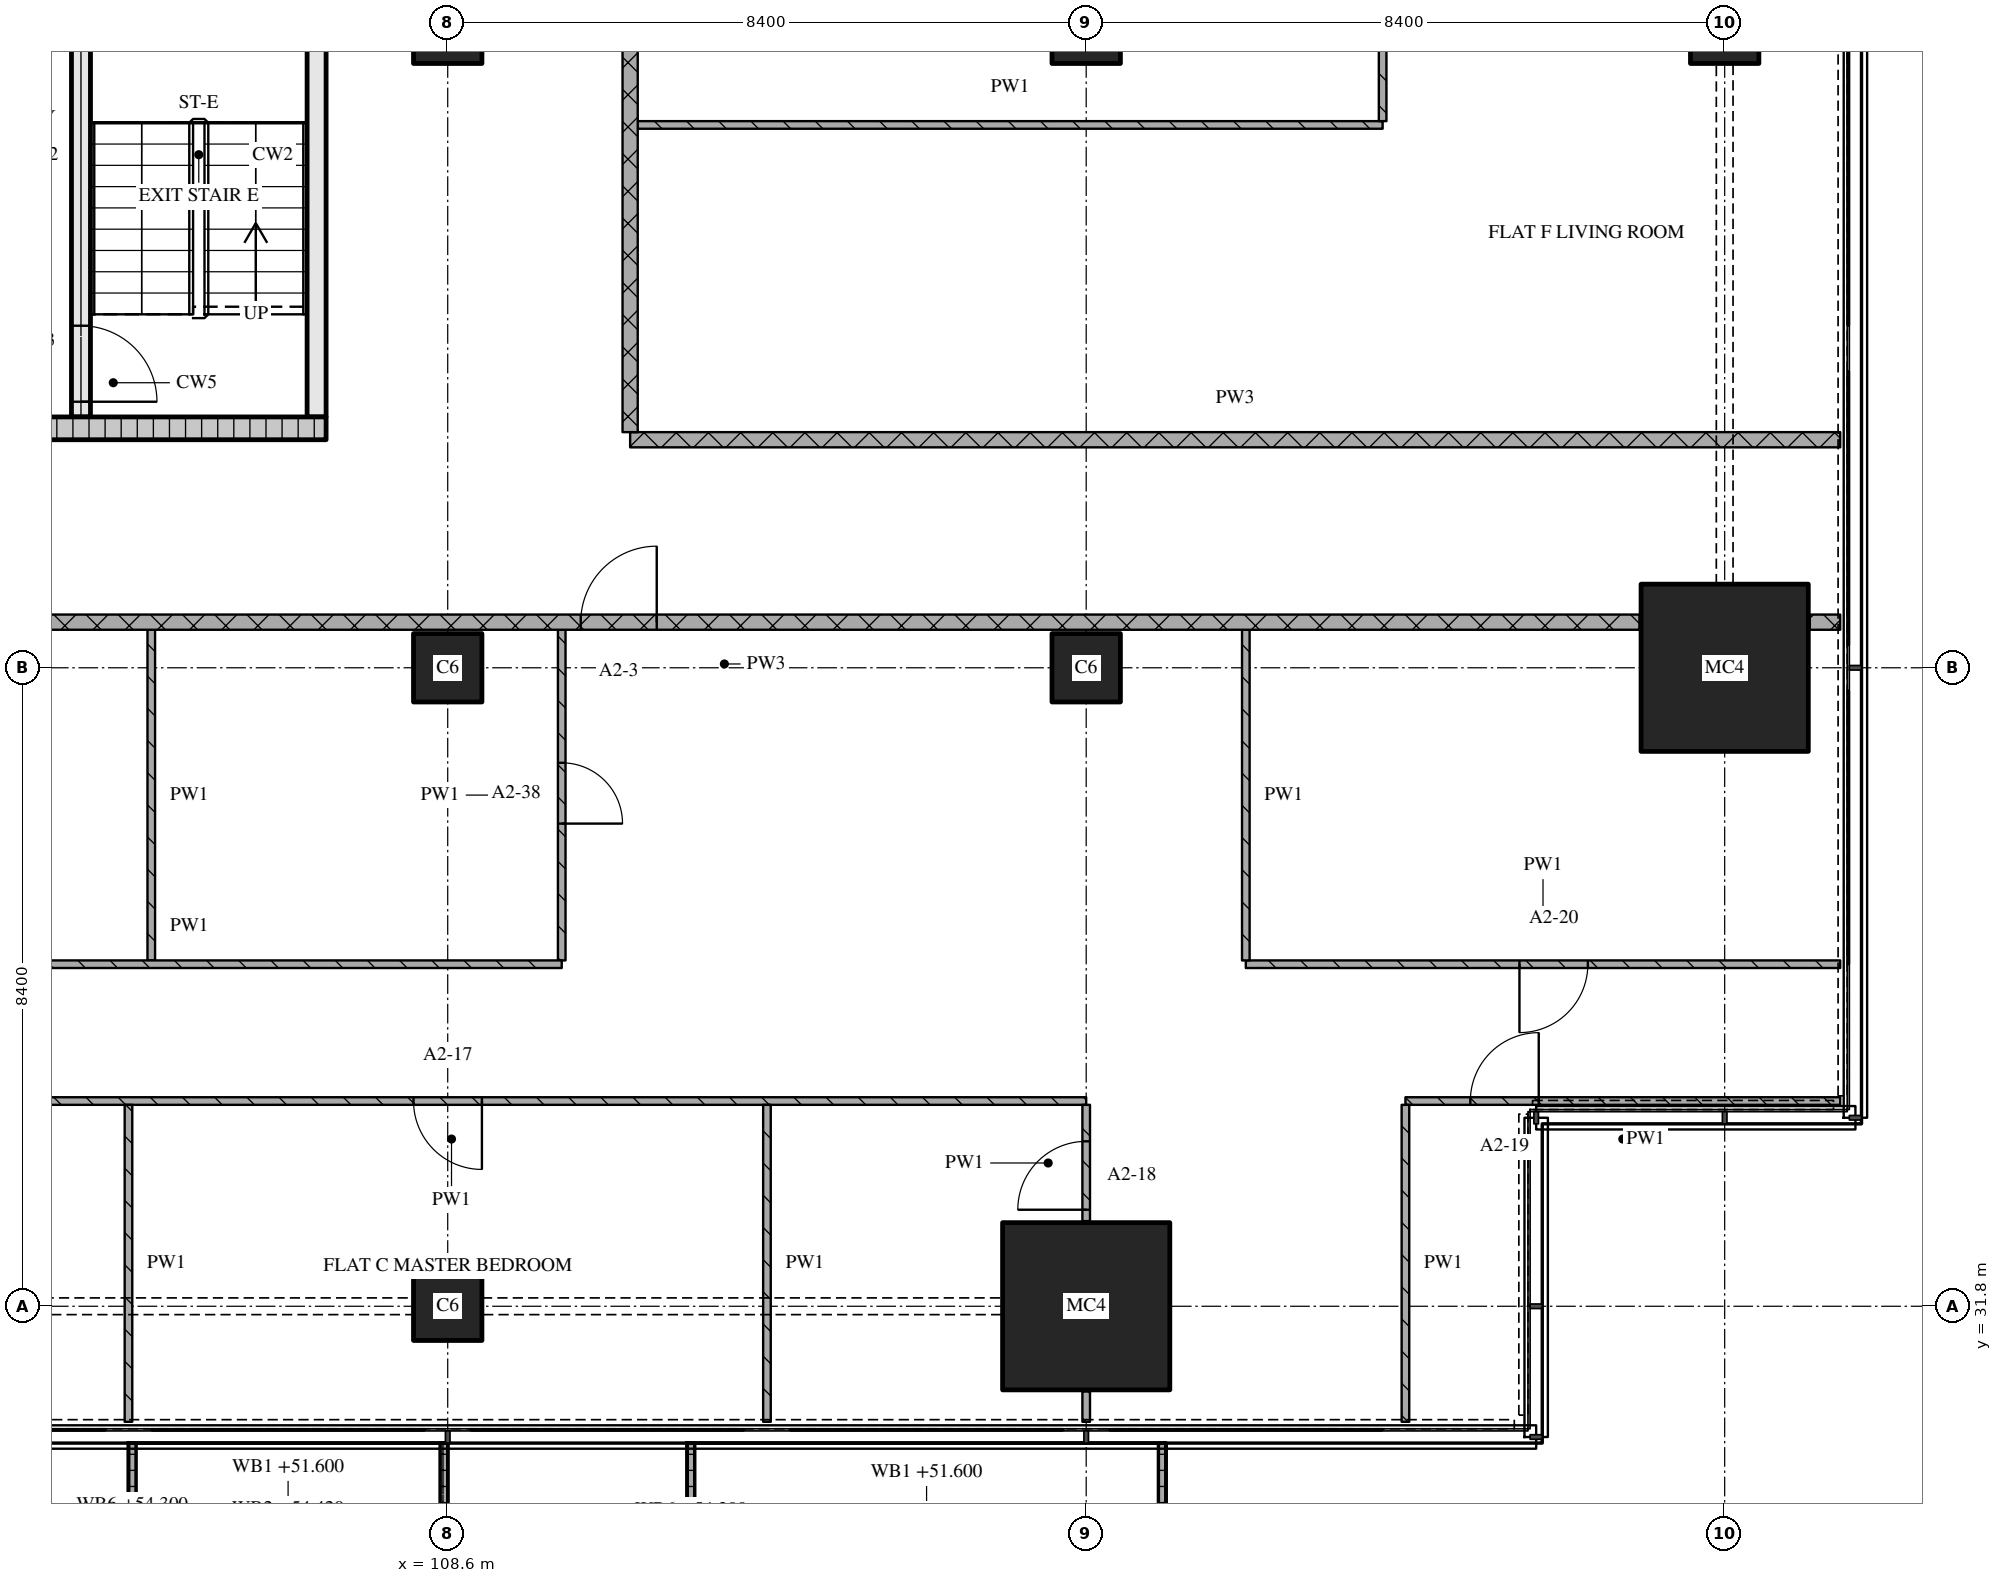
"""IFC4 building model, lengths in metres.
Left out: names, types, materials, properties, quantities, classifications, styles, units other than length and angle.
Written with IfcOpenShell. Run it as: python <this file> out.ifc"""

import sys

from ifc_helpers import new_model, si_unit, direction, frame, frame_2d, origin, origin_2d, place, context, subcontext, project, spatial, polyline, rectangle, outline, extrude, element, fill, save


model = new_model("IFC4")
c1 = context("Model", 3, precision=1e-05, world=origin(), true_north=direction((0.0, 1.0)))
c2 = subcontext(c1, "Body", "Model", "MODEL_VIEW")
j1 = project(units=[si_unit("LENGTHUNIT", "METRE"), si_unit("PLANEANGLEUNIT", "RADIAN")], contexts=[c1])
p1 = place(None, origin())
s1 = spatial("IfcSite", under=j1, at=p1, CompositionType="ELEMENT")
p2 = place(p1, origin())
s2 = spatial("IfcBuilding", under=s1, at=p2, CompositionType="ELEMENT")
p3 = place(p2, frame((0.0, 0.0, 51.6)))
s3 = spatial("IfcBuildingStorey", under=s2, at=p3, CompositionType="ELEMENT", Elevation=51.6)
for number, where, z_axis, x_axis in (
    (1, (108.6, 31.8, 0.0), (0.0, 0.0, 1.0), (1.0, 0.0, 0.0)),
    (2, (108.6, 40.2, 0.0), (0.0, 0.0, 1.0), (1.0, 0.0, 0.0)),
    (3, (108.6, 48.6, 0.0), (0.0, 0.0, 1.0), (1.0, 0.0, 0.0)),
):
    element("IfcColumn", number, at=place(p3, frame(where, z_axis=z_axis, x_axis=x_axis)), inside=s3, PredefinedType="COLUMN", context=c2, shape_type="SweptSolid", body=[
        extrude(rectangle(XDim=0.9, YDim=0.9, at=origin_2d()), origin(), (0.0, 0.0, 1.0), 3.6),
    ])
p4 = place(p3, frame((117.0, 31.8, 0.0), z_axis=(0.0, 0.0, 1.0), x_axis=(1.0, 0.0, 0.0)))
e4 = element("IfcColumn", 4, at=p4, inside=s3, PredefinedType="COLUMN", context=c2, shape_type="SweptSolid", body=[
    extrude(rectangle(XDim=2.2, YDim=2.2, at=origin_2d()), origin(), (0.0, 0.0, 1.0), 3.6),
])
for number, where, z_axis, x_axis in (
    (5, (117.0, 40.2, 0.0), (0.0, 0.0, 1.0), (1.0, 0.0, 0.0)),
    (6, (117.0, 48.6, 0.0), (0.0, 0.0, 1.0), (1.0, 0.0, 0.0)),
):
    element("IfcColumn", number, at=place(p3, frame(where, z_axis=z_axis, x_axis=x_axis)), inside=s3, PredefinedType="COLUMN", context=c2, shape_type="SweptSolid", body=[
        extrude(rectangle(XDim=0.9, YDim=0.9, at=origin_2d()), origin(), (0.0, 0.0, 1.0), 3.6),
    ])
p5 = place(p3, frame((125.4, 40.2, 0.0), z_axis=(0.0, 0.0, 1.0), x_axis=(1.0, 0.0, 0.0)))
e7 = element("IfcColumn", 7, at=p5, inside=s3, PredefinedType="COLUMN", context=c2, shape_type="SweptSolid", body=[
    extrude(rectangle(XDim=2.2, YDim=2.2, at=origin_2d()), origin(), (0.0, 0.0, 1.0), 3.6),
])
p6 = place(p3, frame((125.4, 48.6, 0.0), z_axis=(0.0, 0.0, 1.0), x_axis=(1.0, 0.0, 0.0)))
e8 = element("IfcColumn", 8, at=p6, inside=s3, PredefinedType="COLUMN", context=c2, shape_type="SweptSolid", body=[
    extrude(rectangle(XDim=0.9, YDim=0.9, at=origin_2d()), origin(), (0.0, 0.0, 1.0), 3.6),
])
p7 = place(p3, origin())
e9 = element("IfcWall", 9, at=p7, inside=s3, PredefinedType="SOLIDWALL", context=c2, shape_type="SweptSolid", body=[
    extrude(outline(polyline([(104.4, 30.0), (104.5, 30.0), (104.5, 28.367), (108.5, 28.367), (108.5, 30.0), (108.6, 30.0), (108.6, 28.267), (104.4, 28.267), (104.4, 30.0)])), origin(), (0.0, 0.0, 1.0), 1.0),
])
p8 = place(p3, origin())
e10 = element("IfcWall", 10, at=p8, inside=s3, PredefinedType="SOLIDWALL", context=c2, shape_type="SweptSolid", body=[
    extrude(outline(polyline([(111.75, 30.0), (111.85, 30.0), (111.85, 28.233), (117.95, 28.233), (117.95, 30.0), (118.05, 30.0), (118.05, 28.133), (111.75, 28.133), (111.75, 30.0)])), origin(), (0.0, 0.0, 1.0), 1.0),
])
p9 = place(p3, frame((101.4, 43.35, 0.0), z_axis=(0.0, 0.0, 1.0), x_axis=(1.0, 0.0, 0.0)))
e11 = element("IfcWall", 11, at=p9, inside=s3, PredefinedType="SOLIDWALL", context=c2, shape_type="SweptSolid", body=[
    extrude(rectangle(XDim=5.6, YDim=0.3, at=frame_2d((2.8, 0.0))), origin(), (0.0, 0.0, 1.0), 3.32),
])
p10 = place(p9, frame((0.725, 0.0, 0.0)))
e12 = element("IfcOpeningElement", 12, at=p10, cuts=e11, PredefinedType="OPENING", context=c2, shape_type="SweptSolid", body=[
    extrude(rectangle(XDim=1.0, YDim=2.1, at=frame_2d((0.5, 1.05))), frame((0.0, 0.16, 0.0), z_axis=(0.0, -1.0, 0.0), x_axis=(1.0, 0.0, 0.0)), (0.0, 0.0, 1.0), 0.32),
])
p11 = place(p3, frame((103.775, 43.5, 0.0), z_axis=(0.0, 0.0, 1.0), x_axis=(0.0, 1.0, 0.0)))
e13 = element("IfcWall", 13, at=p11, inside=s3, PredefinedType="SOLIDWALL", context=c2, shape_type="SweptSolid", body=[
    extrude(rectangle(XDim=6.9, YDim=0.25, at=frame_2d((3.45, 0.0))), origin(), (0.0, 0.0, 1.0), 3.32),
])
p12 = place(p11, frame((0.2, 0.0, 0.0)))
e14 = element("IfcOpeningElement", 14, at=p12, cuts=e13, PredefinedType="OPENING", context=c2, shape_type="SweptSolid", body=[
    extrude(rectangle(XDim=1.0, YDim=2.1, at=frame_2d((0.5, 1.05))), frame((0.0, 0.135, 0.0), z_axis=(0.0, -1.0, 0.0), x_axis=(1.0, 0.0, 0.0)), (0.0, 0.0, 1.0), 0.27),
])
p13 = place(p3, frame((106.875, 43.5, 0.0), z_axis=(0.0, 0.0, 1.0), x_axis=(0.0, 1.0, 0.0)))
e15 = element("IfcWall", 15, at=p13, inside=s3, PredefinedType="SOLIDWALL", context=c2, shape_type="SweptSolid", body=[
    extrude(rectangle(XDim=6.9, YDim=0.25, at=frame_2d((3.45, 0.0))), origin(), (0.0, 0.0, 1.0), 3.32),
])
p14 = place(p3, frame((117.0, 34.5, 0.0), z_axis=(0.0, 0.0, 1.0), x_axis=(-1.0, 0.0, 0.0)))
e16 = element("IfcWall", 16, at=p14, inside=s3, PredefinedType="PARTITIONING", context=c2, shape_type="SweptSolid", body=[
    extrude(rectangle(XDim=16.7, YDim=0.1, at=frame_2d((8.35, 0.0))), origin(), (0.0, 0.0, 1.0), 3.32),
])
p15 = place(p14, frame((7.95, 0.0, 0.0)))
e17 = element("IfcOpeningElement", 17, at=p15, cuts=e16, PredefinedType="OPENING", context=c2, shape_type="SweptSolid", body=[
    extrude(rectangle(XDim=0.9, YDim=2.1, at=frame_2d((0.45, 1.05))), frame((0.0, 0.06, 0.0), z_axis=(0.0, -1.0, 0.0), x_axis=(1.0, 0.0, 0.0)), (0.0, 0.0, 1.0), 0.12),
])
p16 = place(p14, frame((14.25, 0.0, 0.0)))
e18 = element("IfcOpeningElement", 18, at=p16, cuts=e16, PredefinedType="OPENING", context=c2, shape_type="SweptSolid", body=[
    extrude(rectangle(XDim=0.9, YDim=2.1, at=frame_2d((0.45, 1.05))), frame((0.0, 0.06, 0.0), z_axis=(0.0, -1.0, 0.0), x_axis=(1.0, 0.0, 0.0)), (0.0, 0.0, 1.0), 0.12),
])
p17 = place(p3, frame((126.92, 34.5, 0.0), z_axis=(0.0, 0.0, 1.0), x_axis=(-1.0, 0.0, 0.0)))
e19 = element("IfcWall", 19, at=p17, inside=s3, PredefinedType="PARTITIONING", context=c2, shape_type="SweptSolid", body=[
    extrude(rectangle(XDim=5.72, YDim=0.1, at=frame_2d((2.86, 0.0))), origin(), (0.0, 0.0, 1.0), 3.32),
])
p18 = place(p17, frame((3.966, 0.0, 0.0)))
e20 = element("IfcOpeningElement", 20, at=p18, cuts=e19, PredefinedType="OPENING", context=c2, shape_type="SweptSolid", body=[
    extrude(rectangle(XDim=0.9, YDim=2.1, at=frame_2d((0.45, 1.05))), frame((0.0, 0.06, 0.0), z_axis=(0.0, -1.0, 0.0), x_axis=(1.0, 0.0, 0.0)), (0.0, 0.0, 1.0), 0.12),
])
p19 = place(p3, frame((119.1, 36.3, 0.0), z_axis=(0.0, 0.0, 1.0), x_axis=(1.0, 0.0, 0.0)))
e21 = element("IfcWall", 21, at=p19, inside=s3, PredefinedType="PARTITIONING", context=c2, shape_type="SweptSolid", body=[
    extrude(rectangle(XDim=7.82, YDim=0.1, at=frame_2d((3.91, 0.0))), origin(), (0.0, 0.0, 1.0), 3.32),
])
p20 = place(p19, frame((3.6, 0.0, 0.0)))
e22 = element("IfcOpeningElement", 22, at=p20, cuts=e21, PredefinedType="OPENING", context=c2, shape_type="SweptSolid", body=[
    extrude(rectangle(XDim=0.9, YDim=2.1, at=frame_2d((0.45, 1.05))), frame((0.0, 0.06, 0.0), z_axis=(0.0, -1.0, 0.0), x_axis=(1.0, 0.0, 0.0)), (0.0, 0.0, 1.0), 0.12),
])
p21 = place(p3, frame((124.28, 40.8, 0.0), z_axis=(0.0, 0.0, 1.0), x_axis=(-1.0, 0.0, 0.0)))
e23 = element("IfcWall", 23, at=p21, inside=s3, PredefinedType="PARTITIONING", context=c2, shape_type="SweptSolid", body=[
    extrude(rectangle(XDim=24.08, YDim=0.2, at=frame_2d((12.04, 0.0))), origin(), (0.0, 0.0, 1.0), 3.32),
])
p22 = place(p21, frame((12.93, 0.0, 0.0)))
e24 = element("IfcOpeningElement", 24, at=p22, cuts=e23, PredefinedType="OPENING", context=c2, shape_type="SweptSolid", body=[
    extrude(rectangle(XDim=1.0, YDim=2.1, at=frame_2d((0.5, 1.05))), frame((0.0, 0.11, 0.0), z_axis=(0.0, -1.0, 0.0), x_axis=(1.0, 0.0, 0.0)), (0.0, 0.0, 1.0), 0.22),
])
p23 = place(p3, frame((126.52, 40.8, 0.0), z_axis=(0.0, 0.0, 1.0), x_axis=(1.0, 0.0, 0.0)))
e25 = element("IfcWall", 25, at=p23, inside=s3, PredefinedType="PARTITIONING", context=c2, shape_type="SweptSolid", body=[
    extrude(rectangle(XDim=0.4, YDim=0.2, at=frame_2d((0.2, 0.0))), origin(), (0.0, 0.0, 1.0), 3.32),
])
p24 = place(p3, frame((111.0, 43.2, 0.0), z_axis=(0.0, 0.0, 1.0), x_axis=(1.0, 0.0, 0.0)))
e26 = element("IfcWall", 26, at=p24, inside=s3, PredefinedType="PARTITIONING", context=c2, shape_type="SweptSolid", body=[
    extrude(rectangle(XDim=15.92, YDim=0.2, at=frame_2d((7.96, 0.0))), origin(), (0.0, 0.0, 1.0), 3.32),
])
p25 = place(p3, frame((111.1, 47.341, 0.0), z_axis=(0.0, 0.0, 1.0), x_axis=(1.0, 0.0, 0.0)))
e27 = element("IfcWall", 27, at=p25, inside=s3, PredefinedType="PARTITIONING", context=c2, shape_type="SweptSolid", body=[
    extrude(rectangle(XDim=9.8, YDim=0.1, at=frame_2d((4.9, 0.0))), origin(), (0.0, 0.0, 1.0), 3.32),
])
p26 = place(p3, frame((104.4, 34.45, 0.0), z_axis=(0.0, 0.0, 1.0), x_axis=(0.0, -1.0, 0.0)))
e28 = element("IfcWall", 28, at=p26, inside=s3, PredefinedType="PARTITIONING", context=c2, shape_type="SweptSolid", body=[
    extrude(rectangle(XDim=4.17, YDim=0.1, at=frame_2d((2.085, 0.0))), origin(), (0.0, 0.0, 1.0), 3.32),
])
p27 = place(p3, frame((104.7, 40.7, 0.0), z_axis=(0.0, 0.0, 1.0), x_axis=(0.0, -1.0, 0.0)))
e29 = element("IfcWall", 29, at=p27, inside=s3, PredefinedType="PARTITIONING", context=c2, shape_type="SweptSolid", body=[
    extrude(rectangle(XDim=4.35, YDim=0.1, at=frame_2d((2.175, 0.0))), origin(), (0.0, 0.0, 1.0), 3.32),
])
p28 = place(p3, frame((110.1, 36.35, 0.0), z_axis=(0.0, 0.0, 1.0), x_axis=(0.0, 1.0, 0.0)))
e30 = element("IfcWall", 30, at=p28, inside=s3, PredefinedType="PARTITIONING", context=c2, shape_type="SweptSolid", body=[
    extrude(rectangle(XDim=4.35, YDim=0.1, at=frame_2d((2.175, 0.0))), origin(), (0.0, 0.0, 1.0), 3.32),
])
p29 = place(p28, frame((1.8, 0.0, 0.0)))
e31 = element("IfcOpeningElement", 31, at=p29, cuts=e30, PredefinedType="OPENING", context=c2, shape_type="SweptSolid", body=[
    extrude(rectangle(XDim=0.8, YDim=2.1, at=frame_2d((0.4, 1.05))), frame((0.0, 0.06, 0.0), z_axis=(0.0, -1.0, 0.0), x_axis=(1.0, 0.0, 0.0)), (0.0, 0.0, 1.0), 0.12),
])
p30 = place(p3, frame((111.0, 75.32, 0.0), z_axis=(0.0, 0.0, 1.0), x_axis=(0.0, -1.0, 0.0)))
e32 = element("IfcWall", 32, at=p30, inside=s3, PredefinedType="PARTITIONING", context=c2, shape_type="SweptSolid", body=[
    extrude(rectangle(XDim=32.02, YDim=0.2, at=frame_2d((16.01, 0.0))), origin(), (0.0, 0.0, 1.0), 3.32),
])
p31 = place(p30, frame((4.47, 0.0, 0.0)))
e33 = element("IfcOpeningElement", 33, at=p31, cuts=e32, PredefinedType="OPENING", context=c2, shape_type="SweptSolid", body=[
    extrude(rectangle(XDim=1.0, YDim=2.1, at=frame_2d((0.5, 1.05))), frame((0.0, 0.11, 0.0), z_axis=(0.0, -1.0, 0.0), x_axis=(1.0, 0.0, 0.0)), (0.0, 0.0, 1.0), 0.22),
])
p32 = place(p30, frame((18.87, 0.0, 0.0)))
e34 = element("IfcOpeningElement", 34, at=p32, cuts=e32, PredefinedType="OPENING", context=c2, shape_type="SweptSolid", body=[
    extrude(rectangle(XDim=1.0, YDim=2.1, at=frame_2d((0.5, 1.05))), frame((0.0, 0.11, 0.0), z_axis=(0.0, -1.0, 0.0), x_axis=(1.0, 0.0, 0.0)), (0.0, 0.0, 1.0), 0.22),
])
p33 = place(p3, frame((112.8, 34.45, 0.0), z_axis=(0.0, 0.0, 1.0), x_axis=(0.0, -1.0, 0.0)))
e35 = element("IfcWall", 35, at=p33, inside=s3, PredefinedType="PARTITIONING", context=c2, shape_type="SweptSolid", body=[
    extrude(rectangle(XDim=4.17, YDim=0.1, at=frame_2d((2.085, 0.0))), origin(), (0.0, 0.0, 1.0), 3.32),
])
p34 = place(p3, frame((117.0, 30.68, 0.0), z_axis=(0.0, 0.0, 1.0), x_axis=(0.0, -1.0, 0.0)))
e36 = element("IfcWall", 36, at=p34, inside=s3, PredefinedType="PARTITIONING", context=c2, shape_type="SweptSolid", body=[
    extrude(rectangle(XDim=0.4, YDim=0.1, at=frame_2d((0.2, 0.0))), origin(), (0.0, 0.0, 1.0), 3.32),
])
p35 = place(p3, frame((117.0, 32.92, 0.0), z_axis=(0.0, 0.0, 1.0), x_axis=(0.0, 1.0, 0.0)))
e37 = element("IfcWall", 37, at=p35, inside=s3, PredefinedType="PARTITIONING", context=c2, shape_type="SweptSolid", body=[
    extrude(rectangle(XDim=1.53, YDim=0.1, at=frame_2d((0.765, 0.0))), origin(), (0.0, 0.0, 1.0), 3.32),
])
p36 = place(p35, frame((0.15, 0.0, 0.0)))
e38 = element("IfcOpeningElement", 38, at=p36, cuts=e37, PredefinedType="OPENING", context=c2, shape_type="SweptSolid", body=[
    extrude(rectangle(XDim=0.9, YDim=2.1, at=frame_2d((0.45, 1.05))), frame((0.0, 0.06, 0.0), z_axis=(0.0, -1.0, 0.0), x_axis=(1.0, 0.0, 0.0)), (0.0, 0.0, 1.0), 0.12),
])
p37 = place(p3, frame((119.1, 40.7, 0.0), z_axis=(0.0, 0.0, 1.0), x_axis=(0.0, -1.0, 0.0)))
e39 = element("IfcWall", 39, at=p37, inside=s3, PredefinedType="PARTITIONING", context=c2, shape_type="SweptSolid", body=[
    extrude(rectangle(XDim=4.35, YDim=0.1, at=frame_2d((2.175, 0.0))), origin(), (0.0, 0.0, 1.0), 3.32),
])
p38 = place(p3, frame((120.9, 47.391, 0.0), z_axis=(0.0, 0.0, 1.0), x_axis=(0.0, 1.0, 0.0)))
e40 = element("IfcWall", 40, at=p38, inside=s3, PredefinedType="PARTITIONING", context=c2, shape_type="SweptSolid", body=[
    extrude(rectangle(XDim=7.759, YDim=0.1, at=frame_2d((3.879, 0.0))), origin(), (0.0, 0.0, 1.0), 3.32),
])
p39 = place(p38, frame((3.429, 0.0, 0.0)))
e41 = element("IfcOpeningElement", 41, at=p39, cuts=e40, PredefinedType="OPENING", context=c2, shape_type="SweptSolid", body=[
    extrude(rectangle(XDim=0.9, YDim=2.1, at=frame_2d((0.45, 1.05))), frame((0.0, 0.06, 0.0), z_axis=(0.0, -1.0, 0.0), x_axis=(1.0, 0.0, 0.0)), (0.0, 0.0, 1.0), 0.12),
])
p40 = place(p3, frame((121.2, 34.45, 0.0), z_axis=(0.0, 0.0, 1.0), x_axis=(0.0, -1.0, 0.0)))
e42 = element("IfcWall", 42, at=p40, inside=s3, PredefinedType="PARTITIONING", context=c2, shape_type="SweptSolid", body=[
    extrude(rectangle(XDim=4.17, YDim=0.1, at=frame_2d((2.085, 0.0))), origin(), (0.0, 0.0, 1.0), 3.32),
])
p41 = place(p3, frame((100.3, 36.3, 0.0), z_axis=(0.0, 0.0, 1.0), x_axis=(1.0, 0.0, 0.0)))
e43 = element("IfcWall", 43, at=p41, inside=s3, PredefinedType="PARTITIONING", context=c2, shape_type="SweptSolid", body=[
    extrude(rectangle(XDim=9.8, YDim=0.1, at=frame_2d((4.9, 0.0))), origin(), (0.0, 0.0, 1.0), 3.32),
])
p42 = place(p41, frame((1.75, 0.0, 0.0)))
e44 = element("IfcOpeningElement", 44, at=p42, cuts=e43, PredefinedType="OPENING", context=c2, shape_type="SweptSolid", body=[
    extrude(rectangle(XDim=0.8, YDim=2.1, at=frame_2d((0.4, 1.05))), frame((0.0, 0.06, 0.0), z_axis=(0.0, -1.0, 0.0), x_axis=(1.0, 0.0, 0.0)), (0.0, 0.0, 1.0), 0.12),
])
p43 = place(p12, origin())
e45 = element("IfcDoor", 45, at=p43, inside=s3, OperationType="SINGLE_SWING_RIGHT", PredefinedType="DOOR", context=c2, shape_type="SweptSolid", body=[
    extrude(rectangle(XDim=1.0, YDim=2.1, at=frame_2d((0.5, 1.05))), frame((0.0, 0.025, 0.0), z_axis=(0.0, -1.0, 0.0), x_axis=(1.0, 0.0, 0.0)), (0.0, 0.0, 1.0), 0.05),
])
fill(e14, e45)
p44 = place(p15, origin())
e46 = element("IfcDoor", 46, at=p44, inside=s3, OperationType="SINGLE_SWING_LEFT", PredefinedType="DOOR", context=c2, shape_type="SweptSolid", body=[
    extrude(rectangle(XDim=0.9, YDim=2.1, at=frame_2d((0.45, 1.05))), frame((0.0, 0.025, 0.0), z_axis=(0.0, -1.0, 0.0), x_axis=(1.0, 0.0, 0.0)), (0.0, 0.0, 1.0), 0.05),
])
fill(e17, e46)
p45 = place(p18, origin())
e47 = element("IfcDoor", 47, at=p45, inside=s3, OperationType="SINGLE_SWING_RIGHT", PredefinedType="DOOR", context=c2, shape_type="SweptSolid", body=[
    extrude(rectangle(XDim=0.9, YDim=2.1, at=frame_2d((0.45, 1.05))), frame((0.0, 0.025, 0.0), z_axis=(0.0, -1.0, 0.0), x_axis=(1.0, 0.0, 0.0)), (0.0, 0.0, 1.0), 0.05),
])
fill(e20, e47)
p46 = place(p20, origin())
e48 = element("IfcDoor", 48, at=p46, inside=s3, OperationType="SINGLE_SWING_RIGHT", PredefinedType="DOOR", context=c2, shape_type="SweptSolid", body=[
    extrude(rectangle(XDim=0.9, YDim=2.1, at=frame_2d((0.45, 1.05))), frame((0.0, 0.025, 0.0), z_axis=(0.0, -1.0, 0.0), x_axis=(1.0, 0.0, 0.0)), (0.0, 0.0, 1.0), 0.05),
])
fill(e22, e48)
p47 = place(p22, origin())
e49 = element("IfcDoor", 49, at=p47, inside=s3, OperationType="SINGLE_SWING_RIGHT", PredefinedType="DOOR", context=c2, shape_type="SweptSolid", body=[
    extrude(rectangle(XDim=1.0, YDim=2.1, at=frame_2d((0.5, 1.05))), frame((0.0, 0.025, 0.0), z_axis=(0.0, -1.0, 0.0), x_axis=(1.0, 0.0, 0.0)), (0.0, 0.0, 1.0), 0.05),
])
fill(e24, e49)
p48 = place(p29, origin())
e50 = element("IfcDoor", 50, at=p48, inside=s3, OperationType="SINGLE_SWING_RIGHT", PredefinedType="DOOR", context=c2, shape_type="SweptSolid", body=[
    extrude(rectangle(XDim=0.8, YDim=2.1, at=frame_2d((0.4, 1.05))), frame((0.0, 0.025, 0.0), z_axis=(0.0, -1.0, 0.0), x_axis=(1.0, 0.0, 0.0)), (0.0, 0.0, 1.0), 0.05),
])
fill(e31, e50)
p49 = place(p36, origin())
e51 = element("IfcDoor", 51, at=p49, inside=s3, OperationType="SINGLE_SWING_LEFT", PredefinedType="DOOR", context=c2, shape_type="SweptSolid", body=[
    extrude(rectangle(XDim=0.9, YDim=2.1, at=frame_2d((0.45, 1.05))), frame((0.0, 0.025, 0.0), z_axis=(0.0, -1.0, 0.0), x_axis=(1.0, 0.0, 0.0)), (0.0, 0.0, 1.0), 0.05),
])
fill(e38, e51)
save(model, sys.argv[1])
